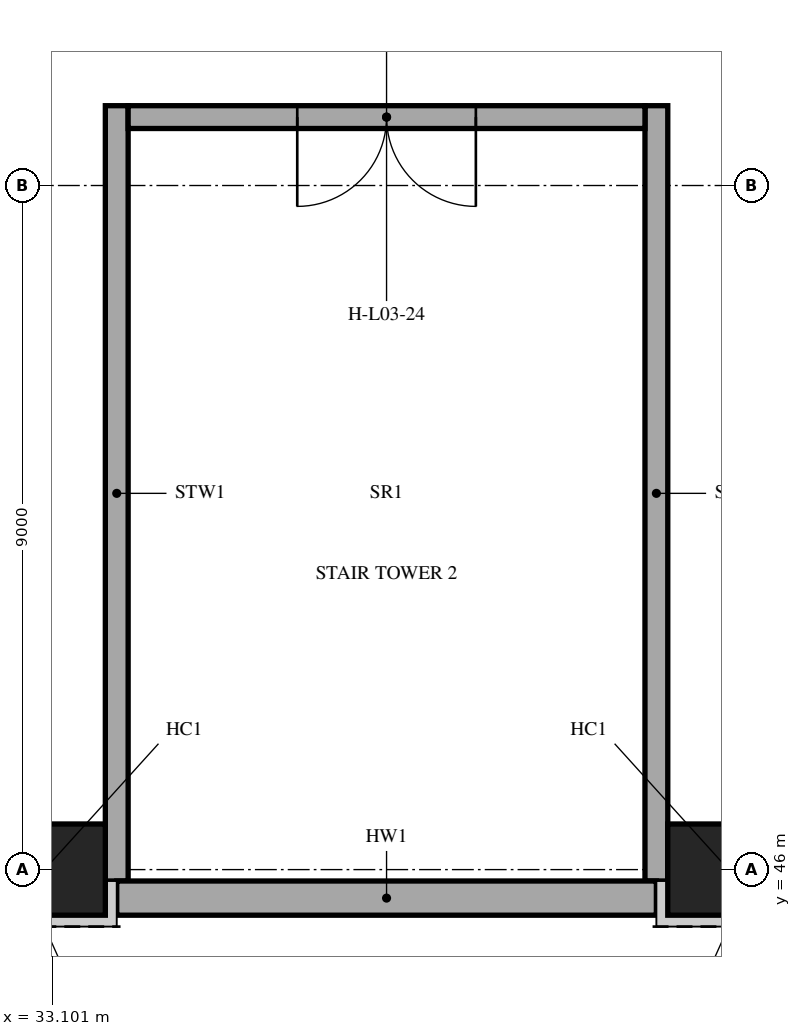
"""IFC4 building model, lengths in metres.
Left out: names, types, materials, properties, quantities, classifications, styles, units other than length and angle.
Written with IfcOpenShell. Run it as: python <this file> out.ifc"""

import sys

from ifc_helpers import new_model, si_unit, direction, frame, frame_2d, origin, origin_2d, place, context, subcontext, project, spatial, rectangle, extrude, element, fill, save


model = new_model("IFC4")
c1 = context("Model", 3, precision=1e-05, world=origin(), true_north=direction((0.0, 1.0)))
c2 = subcontext(c1, "Body", "Model", "MODEL_VIEW")
j1 = project(units=[si_unit("LENGTHUNIT", "METRE"), si_unit("PLANEANGLEUNIT", "RADIAN")], contexts=[c1])
p1 = place(None, origin())
s1 = spatial("IfcSite", under=j1, at=p1, CompositionType="ELEMENT")
p2 = place(p1, origin())
s2 = spatial("IfcBuilding", under=s1, at=p2, CompositionType="ELEMENT")
p3 = place(p2, frame((0.0, 0.0, 15.0)))
s3 = spatial("IfcBuildingStorey", under=s2, at=p3, CompositionType="ELEMENT", Elevation=15.0)
for number, where, z_axis, x_axis in (
    (1, (33.0, 46.0, 0.0), (0.0, 0.0, 1.0), (1.0, 0.0, 0.0)),
    (2, (42.0, 46.0, 0.0), (0.0, 0.0, 1.0), (1.0, 0.0, 0.0)),
):
    element("IfcColumn", number, at=place(p3, frame(where, z_axis=z_axis, x_axis=x_axis)), inside=s3, PredefinedType="COLUMN", context=c2, shape_type="SweptSolid", body=[
        extrude(rectangle(XDim=1.6, YDim=1.2, at=origin_2d()), origin(), (0.0, 0.0, 1.0), 4.2),
    ])
for number, where, z_axis, x_axis in (
    (3, (33.95, 45.85, 0.0), (0.0, 0.0, 1.0), (0.0, 1.0, 0.0)),
    (4, (41.05, 45.85, 0.0), (0.0, 0.0, 1.0), (0.0, 1.0, 0.0)),
):
    element("IfcWall", number, at=place(p3, frame(where, z_axis=z_axis, x_axis=x_axis)), inside=s3, PredefinedType="SHEAR", context=c2, shape_type="SweptSolid", body=[
        extrude(rectangle(XDim=10.2, YDim=0.3, at=frame_2d((5.1, 0.0))), origin(), (0.0, 0.0, 1.0), 3.9),
    ])
p4 = place(p3, frame((34.1, 55.9, 0.0), z_axis=(0.0, 0.0, 1.0), x_axis=(1.0, 0.0, 0.0)))
e5 = element("IfcWall", 5, at=p4, inside=s3, PredefinedType="SHEAR", context=c2, shape_type="SweptSolid", body=[
    extrude(rectangle(XDim=6.8, YDim=0.3, at=frame_2d((3.4, 0.0))), origin(), (0.0, 0.0, 1.0), 3.9),
])
p5 = place(p4, frame((2.225, 0.0, 0.0)))
e6 = element("IfcOpeningElement", 6, at=p5, cuts=e5, PredefinedType="OPENING", context=c2, shape_type="SweptSolid", body=[
    extrude(rectangle(XDim=2.35, YDim=2.1, at=frame_2d((1.175, 1.05))), frame((0.0, 0.16, 0.0), z_axis=(0.0, -1.0, 0.0), x_axis=(1.0, 0.0, 0.0)), (0.0, 0.0, 1.0), 0.32),
])
p6 = place(p3, frame((33.95, 45.625, 0.0), z_axis=(0.0, 0.0, 1.0), x_axis=(1.0, 0.0, 0.0)))
e7 = element("IfcWall", 7, at=p6, inside=s3, PredefinedType="SOLIDWALL", context=c2, shape_type="SweptSolid", body=[
    extrude(rectangle(XDim=7.1, YDim=0.45, at=frame_2d((3.55, 0.0))), origin(), (0.0, 0.0, 1.0), 4.2),
])
p7 = place(p5, frame((2.35, 0.0, 0.0), z_axis=(0.0, 0.0, 1.0), x_axis=(-1.0, 0.0, 0.0)))
e8 = element("IfcDoor", 8, at=p7, inside=s3, OperationType="DOUBLE_DOOR_SINGLE_SWING", PredefinedType="DOOR", context=c2, shape_type="SweptSolid", body=[
    extrude(rectangle(XDim=2.35, YDim=2.1, at=frame_2d((1.175, 1.05))), frame((0.0, 0.025, 0.0), z_axis=(0.0, -1.0, 0.0), x_axis=(1.0, 0.0, 0.0)), (0.0, 0.0, 1.0), 0.05),
])
fill(e6, e8)
save(model, sys.argv[1])
